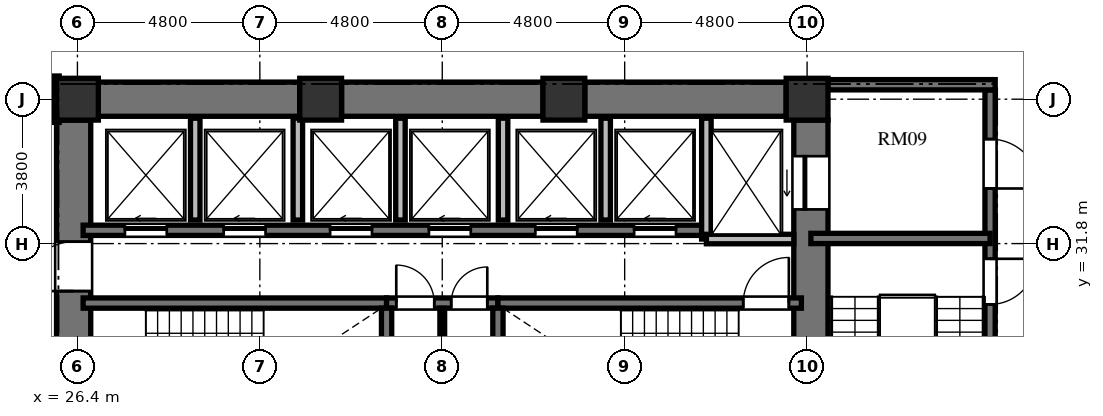
"""IFC4 building model, lengths in metres.
Left out: names, types, materials, properties, quantities, classifications, styles, units other than length and angle.
Written with IfcOpenShell. Run it as: python <this file> out.ifc"""

import sys

from ifc_helpers import new_model, si_unit, direction, frame, frame_2d, origin, origin_2d, place, context, subcontext, project, spatial, rectangle, extrude, element, fill, save


model = new_model("IFC4")
c1 = context("Model", 3, precision=1e-05, world=origin(), true_north=direction((0.0, 1.0)))
c2 = subcontext(c1, "Body", "Model", "MODEL_VIEW")
j1 = project(units=[si_unit("LENGTHUNIT", "METRE"), si_unit("PLANEANGLEUNIT", "RADIAN")], contexts=[c1])
p1 = place(None, origin())
s1 = spatial("IfcSite", under=j1, at=p1, CompositionType="ELEMENT")
p2 = place(p1, origin())
s2 = spatial("IfcBuilding", under=s1, at=p2, CompositionType="ELEMENT")
p3 = place(p2, frame((0.0, 0.0, 39.792)))
s3 = spatial("IfcBuildingStorey", under=s2, at=p3, CompositionType="ELEMENT", Elevation=39.792)
for number, where, z_axis, x_axis in (
    (1, (45.6, 35.6, 0.0), (0.0, 0.0, 1.0), (1.0, 0.0, 0.0)),
    (2, (39.2, 35.6, 0.0), (0.0, 0.0, 1.0), (1.0, 0.0, 0.0)),
    (3, (32.8, 35.6, 0.0), (0.0, 0.0, 1.0), (1.0, 0.0, 0.0)),
    (4, (26.4, 35.6, 0.0), (0.0, 0.0, 1.0), (1.0, 0.0, 0.0)),
):
    element("IfcColumn", number, at=place(p3, frame(where, z_axis=z_axis, x_axis=x_axis)), inside=s3, PredefinedType="COLUMN", context=c2, shape_type="SweptSolid", body=[
        extrude(rectangle(XDim=1.1, YDim=1.1, at=origin_2d()), origin(), (0.0, 0.0, 1.0), 3.648),
    ])
p4 = place(p3, frame((26.3, 20.95, 0.0), z_axis=(0.0, 0.0, 1.0), x_axis=(0.0, 1.0, 0.0)))
e5 = element("IfcWall", 5, at=p4, inside=s3, PredefinedType="SHEAR", context=c2, shape_type="SweptSolid", body=[
    extrude(rectangle(XDim=14.1, YDim=0.9, at=frame_2d((7.05, 0.0))), origin(), (0.0, 0.0, 1.0), 3.648),
])
p5 = place(p4, frame((6.5, 0.0, 0.0)))
e6 = element("IfcOpeningElement", 6, at=p5, cuts=e5, PredefinedType="OPENING", context=c2, shape_type="SweptSolid", body=[
    extrude(rectangle(XDim=1.2, YDim=2.15, at=frame_2d((0.6, 1.075))), frame((0.0, 0.46, 0.0), z_axis=(0.0, -1.0, 0.0), x_axis=(1.0, 0.0, 0.0)), (0.0, 0.0, 1.0), 0.92),
])
p6 = place(p4, frame((9.6, 0.0, 0.0)))
e7 = element("IfcOpeningElement", 7, at=p6, cuts=e5, PredefinedType="OPENING", context=c2, shape_type="SweptSolid", body=[
    extrude(rectangle(XDim=1.3, YDim=2.2, at=frame_2d((0.65, 1.1))), frame((0.0, 0.46, 0.0), z_axis=(0.0, -1.0, 0.0), x_axis=(1.0, 0.0, 0.0)), (0.0, 0.0, 1.0), 0.92),
])
p7 = place(p4, frame((3.26, 0.0, 0.0)))
e8 = element("IfcOpeningElement", 8, at=p7, cuts=e5, PredefinedType="OPENING", context=c2, shape_type="SweptSolid", body=[
    extrude(rectangle(XDim=1.3, YDim=2.2, at=frame_2d((0.65, 1.1))), frame((0.0, 0.46, 0.0), z_axis=(0.0, -1.0, 0.0), x_axis=(1.0, 0.0, 0.0)), (0.0, 0.0, 1.0), 0.92),
])
p8 = place(p3, frame((45.7, 20.95, 0.0), z_axis=(0.0, 0.0, 1.0), x_axis=(0.0, 1.0, 0.0)))
e9 = element("IfcWall", 9, at=p8, inside=s3, PredefinedType="SHEAR", context=c2, shape_type="SweptSolid", body=[
    extrude(rectangle(XDim=14.1, YDim=0.9, at=frame_2d((7.05, 0.0))), origin(), (0.0, 0.0, 1.0), 3.648),
])
p9 = place(p8, frame((11.75, 0.0, 0.0)))
e10 = element("IfcOpeningElement", 10, at=p9, cuts=e9, PredefinedType="OPENING", context=c2, shape_type="SweptSolid", body=[
    extrude(rectangle(XDim=1.4, YDim=2.3, at=frame_2d((0.7, 1.15))), frame((0.0, 0.46, 0.0), z_axis=(0.0, -1.0, 0.0), x_axis=(1.0, 0.0, 0.0)), (0.0, 0.0, 1.0), 0.92),
])
p10 = place(p8, frame((0.95, 0.0, 0.0)))
e11 = element("IfcOpeningElement", 11, at=p10, cuts=e9, PredefinedType="OPENING", context=c2, shape_type="SweptSolid", body=[
    extrude(rectangle(XDim=1.4, YDim=2.3, at=frame_2d((0.7, 1.15))), frame((0.0, 0.46, 0.0), z_axis=(0.0, -1.0, 0.0), x_axis=(1.0, 0.0, 0.0)), (0.0, 0.0, 1.0), 0.92),
])
p11 = place(p3, frame((26.95, 35.6, 0.0), z_axis=(0.0, 0.0, 1.0), x_axis=(1.0, 0.0, 0.0)))
e12 = element("IfcWall", 12, at=p11, inside=s3, PredefinedType="SHEAR", context=c2, shape_type="SweptSolid", body=[
    extrude(rectangle(XDim=5.3, YDim=0.9, at=frame_2d((2.65, 0.0))), origin(), (0.0, 0.0, 1.0), 3.648),
])
p12 = place(p3, frame((33.35, 35.6, 0.0), z_axis=(0.0, 0.0, 1.0), x_axis=(1.0, 0.0, 0.0)))
e13 = element("IfcWall", 13, at=p12, inside=s3, PredefinedType="SHEAR", context=c2, shape_type="SweptSolid", body=[
    extrude(rectangle(XDim=5.3, YDim=0.9, at=frame_2d((2.65, 0.0))), origin(), (0.0, 0.0, 1.0), 3.648),
])
p13 = place(p3, frame((39.75, 35.6, 0.0), z_axis=(0.0, 0.0, 1.0), x_axis=(1.0, 0.0, 0.0)))
e14 = element("IfcWall", 14, at=p13, inside=s3, PredefinedType="SHEAR", context=c2, shape_type="SweptSolid", body=[
    extrude(rectangle(XDim=5.3, YDim=0.9, at=frame_2d((2.65, 0.0))), origin(), (0.0, 0.0, 1.0), 3.648),
])
p14 = place(p3, frame((26.55, 30.235, 0.0), z_axis=(0.0, 0.0, 1.0), x_axis=(1.0, 0.0, 0.0)))
e15 = element("IfcWall", 15, at=p14, inside=s3, PredefinedType="SHEAR", context=c2, shape_type="SweptSolid", body=[
    extrude(rectangle(XDim=7.985, YDim=0.27, at=frame_2d((3.992, 0.0))), origin(), (0.0, 0.0, 1.0), 3.648),
])
p15 = place(p3, frame((34.535, 30.235, 0.0), z_axis=(0.0, 0.0, 1.0), x_axis=(1.0, 0.0, 0.0)))
e16 = element("IfcWall", 16, at=p15, inside=s3, PredefinedType="SHEAR", context=c2, shape_type="SweptSolid", body=[
    extrude(rectangle(XDim=2.93, YDim=0.27, at=frame_2d((1.465, 0.0))), origin(), (0.0, 0.0, 1.0), 3.648),
])
p16 = place(p15, frame((0.255, 0.0, 0.0)))
e17 = element("IfcOpeningElement", 17, at=p16, cuts=e16, PredefinedType="OPENING", context=c2, shape_type="SweptSolid", body=[
    extrude(rectangle(XDim=1.0, YDim=2.1, at=frame_2d((0.5, 1.05))), frame((0.0, 0.145, 0.0), z_axis=(0.0, -1.0, 0.0), x_axis=(1.0, 0.0, 0.0)), (0.0, 0.0, 1.0), 0.29),
])
p17 = place(p15, frame((1.7, 0.0, 0.0)))
e18 = element("IfcOpeningElement", 18, at=p17, cuts=e16, PredefinedType="OPENING", context=c2, shape_type="SweptSolid", body=[
    extrude(rectangle(XDim=0.95, YDim=2.1, at=frame_2d((0.475, 1.05))), frame((0.0, 0.145, 0.0), z_axis=(0.0, -1.0, 0.0), x_axis=(1.0, 0.0, 0.0)), (0.0, 0.0, 1.0), 0.29),
])
p18 = place(p3, frame((37.465, 30.235, 0.0), z_axis=(0.0, 0.0, 1.0), x_axis=(1.0, 0.0, 0.0)))
e19 = element("IfcWall", 19, at=p18, inside=s3, PredefinedType="SHEAR", context=c2, shape_type="SweptSolid", body=[
    extrude(rectangle(XDim=7.985, YDim=0.27, at=frame_2d((3.992, 0.0))), origin(), (0.0, 0.0, 1.0), 3.648),
])
p19 = place(p18, frame((6.455, 0.0, 0.0)))
e20 = element("IfcOpeningElement", 20, at=p19, cuts=e19, PredefinedType="OPENING", context=c2, shape_type="SweptSolid", body=[
    extrude(rectangle(XDim=1.2, YDim=2.15, at=frame_2d((0.6, 1.075))), frame((0.0, 0.145, 0.0), z_axis=(0.0, -1.0, 0.0), x_axis=(1.0, 0.0, 0.0)), (0.0, 0.0, 1.0), 0.29),
])
for number, where, z_axis, x_axis in (
    (21, (34.535, 26.02, 0.0), (0.0, 0.0, 1.0), (0.0, 1.0, 0.0)),
    (22, (37.465, 26.02, 0.0), (0.0, 0.0, 1.0), (0.0, 1.0, 0.0)),
):
    element("IfcWall", number, at=place(p3, frame(where, z_axis=z_axis, x_axis=x_axis)), inside=s3, PredefinedType="SHEAR", context=c2, shape_type="SweptSolid", body=[
        extrude(rectangle(XDim=4.08, YDim=0.27, at=frame_2d((2.04, 0.0))), origin(), (0.0, 0.0, 1.0), 3.648),
    ])
p20 = place(p3, frame((36.0, 26.02, 0.0), z_axis=(0.0, 0.0, 1.0), x_axis=(0.0, 1.0, 0.0)))
e23 = element("IfcWall", 23, at=p20, inside=s3, PredefinedType="PARTITIONING", context=c2, shape_type="SweptSolid", body=[
    extrude(rectangle(XDim=4.08, YDim=0.125, at=frame_2d((2.04, 0.0))), origin(), (0.0, 0.0, 1.0), 3.428),
])
p21 = place(p3, frame((26.55, 32.15, 0.0), z_axis=(0.0, 0.0, 1.0), x_axis=(1.0, 0.0, 0.0)))
e24 = element("IfcWall", 24, at=p21, inside=s3, PredefinedType="SHEAR", context=c2, shape_type="SweptSolid", body=[
    extrude(rectangle(XDim=16.4, YDim=0.27, at=frame_2d((8.2, 0.0))), origin(), (0.0, 0.0, 1.0), 3.648),
])
p22 = place(p21, frame((1.1, 0.0, 0.0)))
e25 = element("IfcOpeningElement", 25, at=p22, cuts=e24, PredefinedType="OPENING", context=c2, shape_type="SweptSolid", body=[
    extrude(rectangle(XDim=1.1, YDim=2.2, at=frame_2d((0.55, 1.1))), frame((0.0, 0.145, 0.0), z_axis=(0.0, -1.0, 0.0), x_axis=(1.0, 0.0, 0.0)), (0.0, 0.0, 1.0), 0.29),
])
p23 = place(p21, frame((3.7, 0.0, 0.0)))
e26 = element("IfcOpeningElement", 26, at=p23, cuts=e24, PredefinedType="OPENING", context=c2, shape_type="SweptSolid", body=[
    extrude(rectangle(XDim=1.1, YDim=2.2, at=frame_2d((0.55, 1.1))), frame((0.0, 0.145, 0.0), z_axis=(0.0, -1.0, 0.0), x_axis=(1.0, 0.0, 0.0)), (0.0, 0.0, 1.0), 0.29),
])
p24 = place(p21, frame((6.5, 0.0, 0.0)))
e27 = element("IfcOpeningElement", 27, at=p24, cuts=e24, PredefinedType="OPENING", context=c2, shape_type="SweptSolid", body=[
    extrude(rectangle(XDim=1.1, YDim=2.2, at=frame_2d((0.55, 1.1))), frame((0.0, 0.145, 0.0), z_axis=(0.0, -1.0, 0.0), x_axis=(1.0, 0.0, 0.0)), (0.0, 0.0, 1.0), 0.29),
])
p25 = place(p21, frame((9.1, 0.0, 0.0)))
e28 = element("IfcOpeningElement", 28, at=p25, cuts=e24, PredefinedType="OPENING", context=c2, shape_type="SweptSolid", body=[
    extrude(rectangle(XDim=1.1, YDim=2.2, at=frame_2d((0.55, 1.1))), frame((0.0, 0.145, 0.0), z_axis=(0.0, -1.0, 0.0), x_axis=(1.0, 0.0, 0.0)), (0.0, 0.0, 1.0), 0.29),
])
p26 = place(p21, frame((11.9, 0.0, 0.0)))
e29 = element("IfcOpeningElement", 29, at=p26, cuts=e24, PredefinedType="OPENING", context=c2, shape_type="SweptSolid", body=[
    extrude(rectangle(XDim=1.1, YDim=2.2, at=frame_2d((0.55, 1.1))), frame((0.0, 0.145, 0.0), z_axis=(0.0, -1.0, 0.0), x_axis=(1.0, 0.0, 0.0)), (0.0, 0.0, 1.0), 0.29),
])
p27 = place(p21, frame((14.5, 0.0, 0.0)))
e30 = element("IfcOpeningElement", 30, at=p27, cuts=e24, PredefinedType="OPENING", context=c2, shape_type="SweptSolid", body=[
    extrude(rectangle(XDim=1.1, YDim=2.2, at=frame_2d((0.55, 1.1))), frame((0.0, 0.145, 0.0), z_axis=(0.0, -1.0, 0.0), x_axis=(1.0, 0.0, 0.0)), (0.0, 0.0, 1.0), 0.29),
])
p28 = place(p3, frame((42.95, 31.92, 0.0), z_axis=(0.0, 0.0, 1.0), x_axis=(0.0, 1.0, 0.0)))
e31 = element("IfcWall", 31, at=p28, inside=s3, PredefinedType="SOLIDWALL", context=c2, shape_type="SweptSolid", body=[
    extrude(rectangle(XDim=3.18, YDim=0.25, at=frame_2d((1.59, 0.0))), origin(), (0.0, 0.0, 1.0), 3.428),
])
p29 = place(p3, frame((42.95, 31.92, 0.0), z_axis=(0.0, 0.0, 1.0), x_axis=(1.0, 0.0, 0.0)))
e32 = element("IfcWall", 32, at=p29, inside=s3, PredefinedType="SOLIDWALL", context=c2, shape_type="SweptSolid", body=[
    extrude(rectangle(XDim=2.3, YDim=0.25, at=frame_2d((1.15, 0.0))), origin(), (0.0, 0.0, 1.0), 3.428),
])
for number, where, z_axis, x_axis in (
    (33, (29.5, 32.42, 0.0), (0.0, 0.0, 1.0), (0.0, 1.0, 0.0)),
    (34, (32.2, 32.42, 0.0), (0.0, 0.0, 1.0), (0.0, 1.0, 0.0)),
    (35, (34.9, 32.42, 0.0), (0.0, 0.0, 1.0), (0.0, 1.0, 0.0)),
    (36, (37.6, 32.42, 0.0), (0.0, 0.0, 1.0), (0.0, 1.0, 0.0)),
    (37, (40.3, 32.42, 0.0), (0.0, 0.0, 1.0), (0.0, 1.0, 0.0)),
):
    element("IfcWall", number, at=place(p3, frame(where, z_axis=z_axis, x_axis=x_axis)), inside=s3, PredefinedType="SOLIDWALL", context=c2, shape_type="SweptSolid", body=[
        extrude(rectangle(XDim=2.68, YDim=0.25, at=frame_2d((1.34, 0.0))), origin(), (0.0, 0.0, 1.0), 3.428),
    ])
p30 = place(p3, frame((50.415, 35.845, 0.0), z_axis=(0.0, 0.0, 1.0), x_axis=(0.0, -1.0, 0.0)))
e38 = element("IfcWall", 38, at=p30, inside=s3, PredefinedType="SHEAR", context=c2, shape_type="SweptSolid", body=[
    extrude(rectangle(XDim=15.825, YDim=0.27, at=frame_2d((7.913, 0.0))), origin(), (0.0, 0.0, 1.0), 3.648),
])
p31 = place(p30, frame((4.445, 0.0, 0.0)))
e39 = element("IfcOpeningElement", 39, at=p31, cuts=e38, PredefinedType="OPENING", context=c2, shape_type="SweptSolid", body=[
    extrude(rectangle(XDim=1.2, YDim=2.15, at=frame_2d((0.6, 1.075))), frame((0.0, 0.145, 0.0), z_axis=(0.0, -1.0, 0.0), x_axis=(1.0, 0.0, 0.0)), (0.0, 0.0, 1.0), 0.29),
])
p32 = place(p30, frame((1.295, 0.0, 0.0)))
e40 = element("IfcOpeningElement", 40, at=p32, cuts=e38, PredefinedType="OPENING", context=c2, shape_type="SweptSolid", body=[
    extrude(rectangle(XDim=1.3, YDim=2.2, at=frame_2d((0.65, 1.1))), frame((0.0, 0.145, 0.0), z_axis=(0.0, -1.0, 0.0), x_axis=(1.0, 0.0, 0.0)), (0.0, 0.0, 1.0), 0.29),
])
p33 = place(p30, frame((13.095, 0.0, 0.0)))
e41 = element("IfcOpeningElement", 41, at=p33, cuts=e38, PredefinedType="OPENING", context=c2, shape_type="SweptSolid", body=[
    extrude(rectangle(XDim=1.3, YDim=2.2, at=frame_2d((0.65, 1.1))), frame((0.0, 0.145, 0.0), z_axis=(0.0, -1.0, 0.0), x_axis=(1.0, 0.0, 0.0)), (0.0, 0.0, 1.0), 0.29),
])
p34 = place(p3, frame((46.15, 35.98, 0.0), z_axis=(0.0, 0.0, 1.0), x_axis=(1.0, 0.0, 0.0)))
e42 = element("IfcWall", 42, at=p34, inside=s3, PredefinedType="SHEAR", context=c2, shape_type="SweptSolid", body=[
    extrude(rectangle(XDim=4.4, YDim=0.27, at=frame_2d((2.2, 0.0))), origin(), (0.0, 0.0, 1.0), 3.648),
])
p35 = place(p3, frame((45.7, 31.935, 0.0), z_axis=(0.0, 0.0, 1.0), x_axis=(1.0, 0.0, 0.0)))
e43 = element("IfcWall", 43, at=p35, inside=s3, PredefinedType="SHEAR", context=c2, shape_type="SweptSolid", body=[
    extrude(rectangle(XDim=4.715, YDim=0.27, at=frame_2d((2.357, 0.0))), origin(), (0.0, 0.0, 1.0), 3.648),
])
p36 = place(p3, frame((25.83, 36.21, 0.0), z_axis=(0.0, 0.0, 1.0), x_axis=(0.0, -1.0, 0.0)))
e44 = element("IfcWall", 44, at=p36, inside=s3, PredefinedType="PARTITIONING", context=c2, shape_type="SweptSolid", body=[
    extrude(rectangle(XDim=1.22, YDim=0.18, at=frame_2d((0.61, 0.0))), origin(), (0.0, 0.0, 1.0), 3.428),
])
p37 = place(p19, origin())
e45 = element("IfcDoor", 45, at=p37, inside=s3, OperationType="SINGLE_SWING_RIGHT", PredefinedType="DOOR", context=c2, shape_type="SweptSolid", body=[
    extrude(rectangle(XDim=1.2, YDim=2.15, at=frame_2d((0.6, 1.075))), frame((0.0, 0.025, 0.0), z_axis=(0.0, -1.0, 0.0), x_axis=(1.0, 0.0, 0.0)), (0.0, 0.0, 1.0), 0.05),
])
fill(e20, e45)
p38 = place(p16, origin())
e46 = element("IfcDoor", 46, at=p38, inside=s3, OperationType="SINGLE_SWING_LEFT", PredefinedType="DOOR", context=c2, shape_type="SweptSolid", body=[
    extrude(rectangle(XDim=1.0, YDim=2.1, at=frame_2d((0.5, 1.05))), frame((0.0, 0.025, 0.0), z_axis=(0.0, -1.0, 0.0), x_axis=(1.0, 0.0, 0.0)), (0.0, 0.0, 1.0), 0.05),
])
fill(e17, e46)
p39 = place(p17, origin())
e47 = element("IfcDoor", 47, at=p39, inside=s3, OperationType="SINGLE_SWING_RIGHT", PredefinedType="DOOR", context=c2, shape_type="SweptSolid", body=[
    extrude(rectangle(XDim=0.95, YDim=2.1, at=frame_2d((0.475, 1.05))), frame((0.0, 0.025, 0.0), z_axis=(0.0, -1.0, 0.0), x_axis=(1.0, 0.0, 0.0)), (0.0, 0.0, 1.0), 0.05),
])
fill(e18, e47)
p40 = place(p6, origin())
e48 = element("IfcDoor", 48, at=p40, inside=s3, OperationType="SINGLE_SWING_LEFT", PredefinedType="DOOR", context=c2, shape_type="SweptSolid", body=[
    extrude(rectangle(XDim=1.3, YDim=2.2, at=frame_2d((0.65, 1.1))), frame((0.0, 0.025, 0.0), z_axis=(0.0, -1.0, 0.0), x_axis=(1.0, 0.0, 0.0)), (0.0, 0.0, 1.0), 0.05),
])
fill(e7, e48)
p41 = place(p22, origin())
e49 = element("IfcDoor", 49, at=p41, inside=s3, OperationType="SLIDING_TO_LEFT", PredefinedType="DOOR", context=c2, shape_type="SweptSolid", body=[
    extrude(rectangle(XDim=1.1, YDim=2.2, at=frame_2d((0.55, 1.1))), frame((0.0, 0.025, 0.0), z_axis=(0.0, -1.0, 0.0), x_axis=(1.0, 0.0, 0.0)), (0.0, 0.0, 1.0), 0.05),
])
fill(e25, e49)
p42 = place(p23, origin())
e50 = element("IfcDoor", 50, at=p42, inside=s3, OperationType="SLIDING_TO_LEFT", PredefinedType="DOOR", context=c2, shape_type="SweptSolid", body=[
    extrude(rectangle(XDim=1.1, YDim=2.2, at=frame_2d((0.55, 1.1))), frame((0.0, 0.025, 0.0), z_axis=(0.0, -1.0, 0.0), x_axis=(1.0, 0.0, 0.0)), (0.0, 0.0, 1.0), 0.05),
])
fill(e26, e50)
p43 = place(p24, origin())
e51 = element("IfcDoor", 51, at=p43, inside=s3, OperationType="SLIDING_TO_LEFT", PredefinedType="DOOR", context=c2, shape_type="SweptSolid", body=[
    extrude(rectangle(XDim=1.1, YDim=2.2, at=frame_2d((0.55, 1.1))), frame((0.0, 0.025, 0.0), z_axis=(0.0, -1.0, 0.0), x_axis=(1.0, 0.0, 0.0)), (0.0, 0.0, 1.0), 0.05),
])
fill(e27, e51)
p44 = place(p25, origin())
e52 = element("IfcDoor", 52, at=p44, inside=s3, OperationType="SLIDING_TO_LEFT", PredefinedType="DOOR", context=c2, shape_type="SweptSolid", body=[
    extrude(rectangle(XDim=1.1, YDim=2.2, at=frame_2d((0.55, 1.1))), frame((0.0, 0.025, 0.0), z_axis=(0.0, -1.0, 0.0), x_axis=(1.0, 0.0, 0.0)), (0.0, 0.0, 1.0), 0.05),
])
fill(e28, e52)
p45 = place(p26, origin())
e53 = element("IfcDoor", 53, at=p45, inside=s3, OperationType="SLIDING_TO_LEFT", PredefinedType="DOOR", context=c2, shape_type="SweptSolid", body=[
    extrude(rectangle(XDim=1.1, YDim=2.2, at=frame_2d((0.55, 1.1))), frame((0.0, 0.025, 0.0), z_axis=(0.0, -1.0, 0.0), x_axis=(1.0, 0.0, 0.0)), (0.0, 0.0, 1.0), 0.05),
])
fill(e29, e53)
p46 = place(p27, origin())
e54 = element("IfcDoor", 54, at=p46, inside=s3, OperationType="SLIDING_TO_LEFT", PredefinedType="DOOR", context=c2, shape_type="SweptSolid", body=[
    extrude(rectangle(XDim=1.1, YDim=2.2, at=frame_2d((0.55, 1.1))), frame((0.0, 0.025, 0.0), z_axis=(0.0, -1.0, 0.0), x_axis=(1.0, 0.0, 0.0)), (0.0, 0.0, 1.0), 0.05),
])
fill(e30, e54)
p47 = place(p9, origin())
e55 = element("IfcDoor", 55, at=p47, inside=s3, OperationType="SLIDING_TO_LEFT", PredefinedType="DOOR", context=c2, shape_type="SweptSolid", body=[
    extrude(rectangle(XDim=1.4, YDim=2.3, at=frame_2d((0.7, 1.15))), frame((0.0, 0.025, 0.0), z_axis=(0.0, -1.0, 0.0), x_axis=(1.0, 0.0, 0.0)), (0.0, 0.0, 1.0), 0.05),
])
fill(e10, e55)
p48 = place(p31, origin())
e56 = element("IfcDoor", 56, at=p48, inside=s3, OperationType="SINGLE_SWING_LEFT", PredefinedType="DOOR", context=c2, shape_type="SweptSolid", body=[
    extrude(rectangle(XDim=1.2, YDim=2.15, at=frame_2d((0.6, 1.075))), frame((0.0, 0.025, 0.0), z_axis=(0.0, -1.0, 0.0), x_axis=(1.0, 0.0, 0.0)), (0.0, 0.0, 1.0), 0.05),
])
fill(e39, e56)
p49 = place(p32, origin())
e57 = element("IfcDoor", 57, at=p49, inside=s3, OperationType="SINGLE_SWING_RIGHT", PredefinedType="DOOR", context=c2, shape_type="SweptSolid", body=[
    extrude(rectangle(XDim=1.3, YDim=2.2, at=frame_2d((0.65, 1.1))), frame((0.0, 0.025, 0.0), z_axis=(0.0, -1.0, 0.0), x_axis=(1.0, 0.0, 0.0)), (0.0, 0.0, 1.0), 0.05),
])
fill(e40, e57)
save(model, sys.argv[1])
